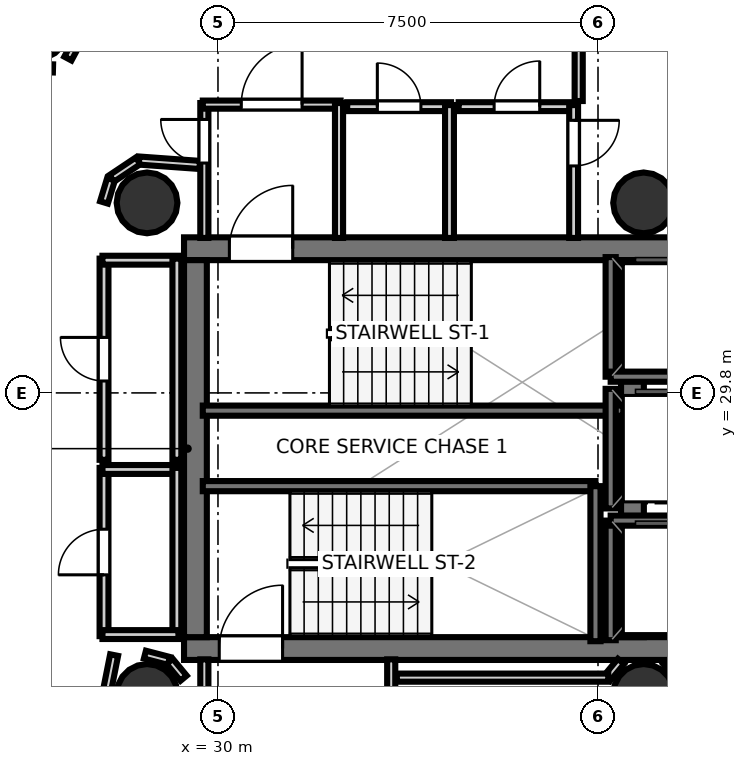
"""IFC4 building model, lengths in metres.
Left out: names, types, materials, properties, quantities, classifications, styles, units other than length and angle.
Written with IfcOpenShell. Run it as: python <this file> out.ifc"""

import sys

from ifc_helpers import new_model, si_unit, direction, frame, frame_2d, origin, origin_2d, place, context, subcontext, project, spatial, rectangle, hollow_circle, extrude, element, fill, save


model = new_model("IFC4")
c1 = context("Model", 3, precision=1e-05, world=origin(), true_north=direction((0.0, 1.0)))
c2 = subcontext(c1, "Body", "Model", "MODEL_VIEW")
j1 = project(units=[si_unit("LENGTHUNIT", "METRE"), si_unit("PLANEANGLEUNIT", "RADIAN")], contexts=[c1])
p1 = place(None, origin())
s1 = spatial("IfcSite", under=j1, at=p1, CompositionType="ELEMENT")
p2 = place(p1, origin())
s2 = spatial("IfcBuilding", under=s1, at=p2, CompositionType="ELEMENT")
p3 = place(p2, frame((0.0, 0.0, 211.4)))
s3 = spatial("IfcBuildingStorey", under=s2, at=p3, CompositionType="ELEMENT", Elevation=211.4)
p4 = place(p3, frame((29.33, 32.645, 0.0), z_axis=(0.0, 0.0, 1.0), x_axis=(1.0, 0.0, 0.0)))
e1 = element("IfcWall", 1, at=p4, inside=s3, PredefinedType="SHEAR", context=c2, shape_type="SweptSolid", body=[
    extrude(rectangle(XDim=10.52, YDim=0.45, at=frame_2d((5.26, 0.0))), origin(), (0.0, 0.0, 1.0), 3.52),
])
p5 = place(p4, frame((0.895, 0.0, 0.0)))
e2 = element("IfcOpeningElement", 2, at=p5, cuts=e1, PredefinedType="OPENING", context=c2, shape_type="SweptSolid", body=[
    extrude(rectangle(XDim=1.25, YDim=2.15, at=frame_2d((0.625, 1.075))), frame((0.0, 0.235, 0.0), z_axis=(0.0, -1.0, 0.0), x_axis=(1.0, 0.0, 0.0)), (0.0, 0.0, 1.0), 0.47),
])
p6 = place(p3, frame((29.33, 24.755, 0.0), z_axis=(0.0, 0.0, 1.0), x_axis=(1.0, 0.0, 0.0)))
e3 = element("IfcWall", 3, at=p6, inside=s3, PredefinedType="SHEAR", context=c2, shape_type="SweptSolid", body=[
    extrude(rectangle(XDim=10.52, YDim=0.45, at=frame_2d((5.26, 0.0))), origin(), (0.0, 0.0, 1.0), 3.52),
])
p7 = place(p6, frame((0.695, 0.0, 0.0)))
e4 = element("IfcOpeningElement", 4, at=p7, cuts=e3, PredefinedType="OPENING", context=c2, shape_type="SweptSolid", body=[
    extrude(rectangle(XDim=1.25, YDim=2.15, at=frame_2d((0.625, 1.075))), frame((0.0, 0.235, 0.0), z_axis=(0.0, -1.0, 0.0), x_axis=(1.0, 0.0, 0.0)), (0.0, 0.0, 1.0), 0.47),
])
for number, where, z_axis, x_axis in (
    (5, (29.555, 24.98, 0.0), (0.0, 0.0, 1.0), (0.0, 1.0, 0.0)),
    (6, (38.18, 24.98, 0.0), (0.0, 0.0, 1.0), (0.0, 1.0, 0.0)),
):
    element("IfcWall", number, at=place(p3, frame(where, z_axis=z_axis, x_axis=x_axis)), inside=s3, PredefinedType="SHEAR", context=c2, shape_type="SweptSolid", body=[
        extrude(rectangle(XDim=7.44, YDim=0.45, at=frame_2d((3.72, 0.0))), origin(), (0.0, 0.0, 1.0), 3.52),
    ])
for number, where, z_axis, x_axis in (
    (7, (28.6, 33.55, 0.0), (0.0, 0.0, 1.0), (1.0, 0.0, 0.0)),
    (8, (28.6, 23.85, 0.0), (0.0, 0.0, 1.0), (1.0, 0.0, 0.0)),
    (9, (38.4, 33.55, 0.0), (0.0, 0.0, 1.0), (1.0, 0.0, 0.0)),
    (10, (38.4, 23.85, 0.0), (0.0, 0.0, 1.0), (1.0, 0.0, 0.0)),
    (11, (26.431, 36.992, 0.0), (0.0, 0.0, 1.0), (1.0, 0.0, 0.0)),
):
    element("IfcColumn", number, at=place(p3, frame(where, z_axis=z_axis, x_axis=x_axis)), inside=s3, PredefinedType="COLUMN", context=c2, shape_type="SweptSolid", body=[
        extrude(hollow_circle(Radius=0.6, WallThickness=0.03, at=origin_2d()), origin(), (0.0, 0.0, 1.0), 3.7),
    ])
p8 = place(p3, frame((29.7, 29.45, 0.0), z_axis=(0.0, 0.0, 1.0), x_axis=(1.0, 0.0, 0.0)))
e12 = element("IfcWall", 12, at=p8, inside=s3, PredefinedType="SOLIDWALL", context=c2, shape_type="SweptSolid", body=[
    extrude(rectangle(XDim=8.3, YDim=0.2, at=frame_2d((4.15, 0.0))), origin(), (0.0, 0.0, 1.0), 3.52),
])
p9 = place(p3, frame((29.7, 27.96, 0.0), z_axis=(0.0, 0.0, 1.0), x_axis=(1.0, 0.0, 0.0)))
e13 = element("IfcWall", 13, at=p9, inside=s3, PredefinedType="SOLIDWALL", context=c2, shape_type="SweptSolid", body=[
    extrude(rectangle(XDim=7.75, YDim=0.2, at=frame_2d((3.875, 0.0))), origin(), (0.0, 0.0, 1.0), 3.52),
])
p10 = place(p3, frame((37.45, 24.9, 0.0), z_axis=(0.0, 0.0, 1.0), x_axis=(0.0, 1.0, 0.0)))
e14 = element("IfcWall", 14, at=p10, inside=s3, PredefinedType="SOLIDWALL", context=c2, shape_type="SweptSolid", body=[
    extrude(rectangle(XDim=3.06, YDim=0.2, at=frame_2d((1.53, 0.0))), origin(), (0.0, 0.0, 1.0), 3.52),
])
p11 = place(p3, frame((37.75, 30.12, 0.0), z_axis=(0.0, 0.0, 1.0), x_axis=(0.0, 1.0, 0.0)))
e15 = element("IfcWall", 15, at=p11, inside=s3, PredefinedType="SOLIDWALL", context=c2, shape_type="SweptSolid", body=[
    extrude(rectangle(XDim=2.36, YDim=0.2, at=frame_2d((1.18, 0.0))), origin(), (0.0, 0.0, 1.0), 3.52),
])
p12 = place(p3, frame((37.75, 30.12, 0.0), z_axis=(0.0, 0.0, 1.0), x_axis=(1.0, 0.0, 0.0)))
e16 = element("IfcWall", 16, at=p12, inside=s3, PredefinedType="SOLIDWALL", context=c2, shape_type="SweptSolid", body=[
    extrude(rectangle(XDim=2.1, YDim=0.2, at=frame_2d((1.05, 0.0))), origin(), (0.0, 0.0, 1.0), 3.52),
])
p13 = place(p3, frame((37.75, 24.92, 0.0), z_axis=(0.0, 0.0, 1.0), x_axis=(0.0, 1.0, 0.0)))
e17 = element("IfcWall", 17, at=p13, inside=s3, PredefinedType="SOLIDWALL", context=c2, shape_type="SweptSolid", body=[
    extrude(rectangle(XDim=2.36, YDim=0.2, at=frame_2d((1.18, 0.0))), origin(), (0.0, 0.0, 1.0), 3.52),
])
p14 = place(p3, frame((37.75, 27.28, 0.0), z_axis=(0.0, 0.0, 1.0), x_axis=(1.0, 0.0, 0.0)))
e18 = element("IfcWall", 18, at=p14, inside=s3, PredefinedType="SOLIDWALL", context=c2, shape_type="SweptSolid", body=[
    extrude(rectangle(XDim=2.1, YDim=0.2, at=frame_2d((1.05, 0.0))), origin(), (0.0, 0.0, 1.0), 3.52),
])
p15 = place(p3, frame((37.75, 27.52, 0.0), z_axis=(0.0, 0.0, 1.0), x_axis=(0.0, 1.0, 0.0)))
e19 = element("IfcWall", 19, at=p15, inside=s3, PredefinedType="SOLIDWALL", context=c2, shape_type="SweptSolid", body=[
    extrude(rectangle(XDim=2.36, YDim=0.2, at=frame_2d((1.18, 0.0))), origin(), (0.0, 0.0, 1.0), 3.52),
])
p16 = place(p3, frame((29.731, 32.858, 0.0), z_axis=(0.0, 0.0, 1.0), x_axis=(0.0, 1.0, 0.0)))
e20 = element("IfcWall", 20, at=p16, inside=s3, PredefinedType="PARTITIONING", context=c2, shape_type="SweptSolid", body=[
    extrude(rectangle(XDim=2.662, YDim=0.16, at=frame_2d((1.331, 0.0))), origin(), (0.0, 0.0, 1.0), 2.84),
])
p17 = place(p16, frame((1.478, 0.0, 0.0)))
e21 = element("IfcOpeningElement", 21, at=p17, cuts=e20, PredefinedType="OPENING", context=c2, shape_type="SweptSolid", body=[
    extrude(rectangle(XDim=0.86, YDim=2.05, at=frame_2d((0.43, 1.025))), frame((0.0, 0.09, 0.0), z_axis=(0.0, -1.0, 0.0), x_axis=(1.0, 0.0, 0.0)), (0.0, 0.0, 1.0), 0.18),
])
p18 = place(p3, frame((29.7, 35.489, 0.0), z_axis=(0.0, 0.0, 1.0), x_axis=(1.0, 0.0, 0.0)))
e22 = element("IfcWall", 22, at=p18, inside=s3, PredefinedType="PARTITIONING", context=c2, shape_type="SweptSolid", body=[
    extrude(rectangle(XDim=2.72, YDim=0.16, at=frame_2d((1.36, 0.0))), origin(), (0.0, 0.0, 1.0), 2.84),
])
p19 = place(p18, frame((0.76, 0.0, 0.0)))
e23 = element("IfcOpeningElement", 23, at=p19, cuts=e22, PredefinedType="OPENING", context=c2, shape_type="SweptSolid", body=[
    extrude(rectangle(XDim=1.2, YDim=2.15, at=frame_2d((0.6, 1.075))), frame((0.0, 0.09, 0.0), z_axis=(0.0, -1.0, 0.0), x_axis=(1.0, 0.0, 0.0)), (0.0, 0.0, 1.0), 0.18),
])
p20 = place(p3, frame((32.389, 35.52, 0.0), z_axis=(0.0, 0.0, 1.0), x_axis=(0.0, -1.0, 0.0)))
e24 = element("IfcWall", 24, at=p20, inside=s3, PredefinedType="PARTITIONING", context=c2, shape_type="SweptSolid", body=[
    extrude(rectangle(XDim=2.662, YDim=0.16, at=frame_2d((1.331, 0.0))), origin(), (0.0, 0.0, 1.0), 2.84),
])
for number, where, z_axis, x_axis in (
    (25, (29.731, 21.85, 0.0), (0.0, 0.0, 1.0), (0.0, 1.0, 0.0)),
    (26, (33.419, 24.542, 0.0), (0.0, 0.0, 1.0), (0.0, -1.0, 0.0)),
):
    element("IfcWall", number, at=place(p3, frame(where, z_axis=z_axis, x_axis=x_axis)), inside=s3, PredefinedType="PARTITIONING", context=c2, shape_type="SweptSolid", body=[
        extrude(rectangle(XDim=2.692, YDim=0.16, at=frame_2d((1.346, 0.0))), origin(), (0.0, 0.0, 1.0), 2.84),
    ])
p21 = place(p3, frame((32.55, 35.449, 0.0), z_axis=(0.0, 0.0, 1.0), x_axis=(1.0, 0.0, 0.0)))
e27 = element("IfcWall", 27, at=p21, inside=s3, PredefinedType="PLUMBINGWALL", context=c2, shape_type="SweptSolid", body=[
    extrude(rectangle(XDim=2.05, YDim=0.175, at=frame_2d((1.025, 0.0))), origin(), (0.0, 0.0, 1.0), 2.84),
])
p22 = place(p21, frame((0.595, 0.0, 0.0)))
e28 = element("IfcOpeningElement", 28, at=p22, cuts=e27, PredefinedType="OPENING", context=c2, shape_type="SweptSolid", body=[
    extrude(rectangle(XDim=0.86, YDim=2.05, at=frame_2d((0.43, 1.025))), frame((0.0, 0.097, 0.0), z_axis=(0.0, -1.0, 0.0), x_axis=(1.0, 0.0, 0.0)), (0.0, 0.0, 1.0), 0.195),
])
p23 = place(p3, frame((34.569, 35.48, 0.0), z_axis=(0.0, 0.0, 1.0), x_axis=(0.0, -1.0, 0.0)))
e29 = element("IfcWall", 29, at=p23, inside=s3, PredefinedType="PLUMBINGWALL", context=c2, shape_type="SweptSolid", body=[
    extrude(rectangle(XDim=2.622, YDim=0.175, at=frame_2d((1.311, 0.0))), origin(), (0.0, 0.0, 1.0), 2.84),
])
p24 = place(p3, frame((34.75, 35.449, 0.0), z_axis=(0.0, 0.0, 1.0), x_axis=(1.0, 0.0, 0.0)))
e30 = element("IfcWall", 30, at=p24, inside=s3, PredefinedType="PLUMBINGWALL", context=c2, shape_type="SweptSolid", body=[
    extrude(rectangle(XDim=2.3, YDim=0.175, at=frame_2d((1.15, 0.0))), origin(), (0.0, 0.0, 1.0), 2.84),
])
p25 = place(p24, frame((0.7, 0.0, 0.0)))
e31 = element("IfcOpeningElement", 31, at=p25, cuts=e30, PredefinedType="OPENING", context=c2, shape_type="SweptSolid", body=[
    extrude(rectangle(XDim=0.9, YDim=2.1, at=frame_2d((0.45, 1.05))), frame((0.0, 0.097, 0.0), z_axis=(0.0, -1.0, 0.0), x_axis=(1.0, 0.0, 0.0)), (0.0, 0.0, 1.0), 0.195),
])
p26 = place(p3, frame((37.019, 35.48, 0.0), z_axis=(0.0, 0.0, 1.0), x_axis=(0.0, -1.0, 0.0)))
e32 = element("IfcWall", 32, at=p26, inside=s3, PredefinedType="PLUMBINGWALL", context=c2, shape_type="SweptSolid", body=[
    extrude(rectangle(XDim=2.622, YDim=0.175, at=frame_2d((1.311, 0.0))), origin(), (0.0, 0.0, 1.0), 2.84),
])
p27 = place(p26, frame((0.301, 0.0, 0.0)))
e33 = element("IfcOpeningElement", 33, at=p27, cuts=e32, PredefinedType="OPENING", context=c2, shape_type="SweptSolid", body=[
    extrude(rectangle(XDim=0.9, YDim=2.1, at=frame_2d((0.45, 1.05))), frame((0.0, 0.097, 0.0), z_axis=(0.0, -1.0, 0.0), x_axis=(1.0, 0.0, 0.0)), (0.0, 0.0, 1.0), 0.195),
])
p28 = place(p3, frame((27.751, 25.0, 0.0), z_axis=(0.0, 0.0, 1.0), x_axis=(0.0, 1.0, 0.0)))
e34 = element("IfcWall", 34, at=p28, inside=s3, PredefinedType="PLUMBINGWALL", context=c2, shape_type="SweptSolid", body=[
    extrude(rectangle(XDim=3.32, YDim=0.175, at=frame_2d((1.66, 0.0))), origin(), (0.0, 0.0, 1.0), 2.84),
])
p29 = place(p28, frame((1.21, 0.0, 0.0)))
e35 = element("IfcOpeningElement", 35, at=p29, cuts=e34, PredefinedType="OPENING", context=c2, shape_type="SweptSolid", body=[
    extrude(rectangle(XDim=0.9, YDim=2.1, at=frame_2d((0.45, 1.05))), frame((0.0, 0.097, 0.0), z_axis=(0.0, -1.0, 0.0), x_axis=(1.0, 0.0, 0.0)), (0.0, 0.0, 1.0), 0.195),
])
p30 = place(p3, frame((27.72, 28.289, 0.0), z_axis=(0.0, 0.0, 1.0), x_axis=(1.0, 0.0, 0.0)))
e36 = element("IfcWall", 36, at=p30, inside=s3, PredefinedType="PLUMBINGWALL", context=c2, shape_type="SweptSolid", body=[
    extrude(rectangle(XDim=1.5, YDim=0.175, at=frame_2d((0.75, 0.0))), origin(), (0.0, 0.0, 1.0), 2.84),
])
p31 = place(p3, frame((29.189, 28.32, 0.0), z_axis=(0.0, 0.0, 1.0), x_axis=(0.0, -1.0, 0.0)))
e37 = element("IfcWall", 37, at=p31, inside=s3, PredefinedType="PLUMBINGWALL", context=c2, shape_type="SweptSolid", body=[
    extrude(rectangle(XDim=3.32, YDim=0.175, at=frame_2d((1.66, 0.0))), origin(), (0.0, 0.0, 1.0), 2.84),
])
p32 = place(p3, frame((29.22, 25.031, 0.0), z_axis=(0.0, 0.0, 1.0), x_axis=(-1.0, 0.0, 0.0)))
e38 = element("IfcWall", 38, at=p32, inside=s3, PredefinedType="PLUMBINGWALL", context=c2, shape_type="SweptSolid", body=[
    extrude(rectangle(XDim=1.5, YDim=0.175, at=frame_2d((0.75, 0.0))), origin(), (0.0, 0.0, 1.0), 2.84),
])
p33 = place(p3, frame((27.751, 28.48, 0.0), z_axis=(0.0, 0.0, 1.0), x_axis=(0.0, 1.0, 0.0)))
e39 = element("IfcWall", 39, at=p33, inside=s3, PredefinedType="PLUMBINGWALL", context=c2, shape_type="SweptSolid", body=[
    extrude(rectangle(XDim=3.97, YDim=0.175, at=frame_2d((1.985, 0.0))), origin(), (0.0, 0.0, 1.0), 2.84),
])
p34 = place(p33, frame((1.555, 0.0, 0.0)))
e40 = element("IfcOpeningElement", 40, at=p34, cuts=e39, PredefinedType="OPENING", context=c2, shape_type="SweptSolid", body=[
    extrude(rectangle(XDim=0.86, YDim=2.05, at=frame_2d((0.43, 1.025))), frame((0.0, 0.097, 0.0), z_axis=(0.0, -1.0, 0.0), x_axis=(1.0, 0.0, 0.0)), (0.0, 0.0, 1.0), 0.195),
])
p35 = place(p3, frame((27.72, 32.419, 0.0), z_axis=(0.0, 0.0, 1.0), x_axis=(1.0, 0.0, 0.0)))
e41 = element("IfcWall", 41, at=p35, inside=s3, PredefinedType="PLUMBINGWALL", context=c2, shape_type="SweptSolid", body=[
    extrude(rectangle(XDim=1.5, YDim=0.175, at=frame_2d((0.75, 0.0))), origin(), (0.0, 0.0, 1.0), 2.84),
])
p36 = place(p3, frame((29.189, 32.45, 0.0), z_axis=(0.0, 0.0, 1.0), x_axis=(0.0, -1.0, 0.0)))
e42 = element("IfcWall", 42, at=p36, inside=s3, PredefinedType="PLUMBINGWALL", context=c2, shape_type="SweptSolid", body=[
    extrude(rectangle(XDim=3.97, YDim=0.175, at=frame_2d((1.985, 0.0))), origin(), (0.0, 0.0, 1.0), 2.84),
])
p37 = place(p3, frame((29.321, 24.17, 0.0), z_axis=(0.0, 0.0, 1.0), x_axis=(-0.638008265708, 0.770029514296, 0.0)))
e43 = element("IfcWall", 43, at=p37, inside=s3, PredefinedType="PARTITIONING", context=c2, shape_type="SweptSolid", body=[
    extrude(rectangle(XDim=0.431, YDim=0.16, at=frame_2d((0.215, 0.0))), origin(), (0.0, 0.0, 1.0), 2.84),
])
p38 = place(p3, frame((29.03, 24.512, 0.0), z_axis=(0.0, 0.0, 1.0), x_axis=(-0.967681003213, 0.252177469296, 0.0)))
e44 = element("IfcWall", 44, at=p38, inside=s3, PredefinedType="PARTITIONING", context=c2, shape_type="SweptSolid", body=[
    extrude(rectangle(XDim=0.488, YDim=0.16, at=frame_2d((0.244, 0.0))), origin(), (0.0, 0.0, 1.0), 2.84),
])
for number, where, z_axis, x_axis in (
    (45, (39.121, 24.17, 0.0), (0.0, 0.0, 1.0), (-0.638, 0.77, 0.0)),
    (46, (37.954, 24.502, 0.0), (0.0, 0.0, 1.0), (-0.638, -0.77, 0.0)),
):
    element("IfcWall", number, at=place(p3, frame(where, z_axis=z_axis, x_axis=x_axis)), inside=s3, PredefinedType="PARTITIONING", context=c2, shape_type="SweptSolid", body=[
        extrude(rectangle(XDim=0.431, YDim=0.16, at=frame_2d((0.215, 0.0))), origin(), (0.0, 0.0, 1.0), 2.84),
    ])
p39 = place(p3, frame((37.703, 24.181, 0.0), z_axis=(0.0, 0.0, 1.0), x_axis=(-1.0, 0.0, 0.0)))
e47 = element("IfcWall", 47, at=p39, inside=s3, PredefinedType="PARTITIONING", context=c2, shape_type="SweptSolid", body=[
    extrude(rectangle(XDim=4.173, YDim=0.16, at=frame_2d((2.086, 0.0))), origin(), (0.0, 0.0, 1.0), 2.84),
])
p40 = place(p3, frame((37.119, 37.896, 0.0), z_axis=(0.0, 0.0, 1.0), x_axis=(0.0, -1.0, 0.0)))
e48 = element("IfcWall", 48, at=p40, inside=s3, PredefinedType="PARTITIONING", context=c2, shape_type="SweptSolid", body=[
    extrude(rectangle(XDim=2.336, YDim=0.16, at=frame_2d((1.168, 0.0))), origin(), (0.0, 0.0, 1.0), 2.84),
])
p41 = place(p3, frame((29.64, 34.299, 0.0), z_axis=(0.0, 0.0, 1.0), x_axis=(-0.997392224386, 0.072171675429, 0.0)))
e49 = element("IfcWall", 49, at=p41, inside=s3, PredefinedType="PARTITIONING", context=c2, shape_type="SweptSolid", body=[
    extrude(rectangle(XDim=1.201, YDim=0.16, at=frame_2d((0.601, 0.0))), origin(), (0.0, 0.0, 1.0), 2.84),
])
p42 = place(p3, frame((28.423, 34.38, 0.0), z_axis=(0.0, 0.0, 1.0), x_axis=(-0.831571279003, -0.555418047903, 0.0)))
e50 = element("IfcWall", 50, at=p42, inside=s3, PredefinedType="PARTITIONING", context=c2, shape_type="SweptSolid", body=[
    extrude(rectangle(XDim=0.628, YDim=0.16, at=frame_2d((0.314, 0.0))), origin(), (0.0, 0.0, 1.0), 2.84),
])
p43 = place(p3, frame((27.888, 34.015, 0.0), z_axis=(0.0, 0.0, 1.0), x_axis=(-0.290263585829, -0.956946733492, 0.0)))
e51 = element("IfcWall", 51, at=p43, inside=s3, PredefinedType="PARTITIONING", context=c2, shape_type="SweptSolid", body=[
    extrude(rectangle(XDim=0.476, YDim=0.16, at=frame_2d((0.238, 0.0))), origin(), (0.0, 0.0, 1.0), 2.84),
])
p44 = place(p3, frame((27.95, 24.626, 0.0), z_axis=(0.0, 0.0, 1.0), x_axis=(-0.195125950178, -0.980778192848, 0.0)))
e52 = element("IfcWall", 52, at=p44, inside=s3, PredefinedType="PARTITIONING", context=c2, shape_type="SweptSolid", body=[
    extrude(rectangle(XDim=0.948, YDim=0.16, at=frame_2d((0.474, 0.0))), origin(), (0.0, 0.0, 1.0), 2.84),
])
p45 = place(p3, frame((25.449, 36.238, 0.0), z_axis=(0.0, 0.0, 1.0), x_axis=(0.999651698073, -0.026390955635, 0.0)))
e53 = element("IfcWall", 53, at=p45, inside=s3, PredefinedType="PARTITIONING", context=c2, shape_type="SweptSolid", body=[
    extrude(rectangle(XDim=1.295, YDim=0.16, at=frame_2d((0.647, 0.0))), origin(), (0.0, 0.0, 1.0), 2.84),
])
p46 = place(p3, frame((27.038, 36.398, 0.0), z_axis=(0.0, 0.0, 1.0), x_axis=(0.471865548338, 0.881670519123, 0.0)))
e54 = element("IfcWall", 54, at=p46, inside=s3, PredefinedType="PARTITIONING", context=c2, shape_type="SweptSolid", body=[
    extrude(rectangle(XDim=0.476, YDim=0.16, at=frame_2d((0.238, 0.0))), origin(), (0.0, 0.0, 1.0), 2.84),
])
p47 = place(p3, frame((37.225, 37.301, 0.0), z_axis=(0.0, 0.0, 1.0), x_axis=(0.987268097612, -0.159065091827, 0.0)))
e55 = element("IfcWall", 55, at=p47, inside=s3, PredefinedType="PLUMBINGWALL", context=c2, shape_type="SweptSolid", body=[
    extrude(rectangle(XDim=11.926, YDim=0.175, at=frame_2d((5.963, 0.0))), origin(), (0.0, 0.0, 1.0), 2.84),
])
p48 = place(p5, origin())
e56 = element("IfcDoor", 56, at=p48, inside=s3, OperationType="SINGLE_SWING_RIGHT", PredefinedType="DOOR", context=c2, shape_type="SweptSolid", body=[
    extrude(rectangle(XDim=1.25, YDim=2.15, at=frame_2d((0.625, 1.075))), frame((0.0, 0.025, 0.0), z_axis=(0.0, -1.0, 0.0), x_axis=(1.0, 0.0, 0.0)), (0.0, 0.0, 1.0), 0.05),
])
fill(e2, e56)
p49 = place(p7, origin())
e57 = element("IfcDoor", 57, at=p49, inside=s3, OperationType="SINGLE_SWING_RIGHT", PredefinedType="DOOR", context=c2, shape_type="SweptSolid", body=[
    extrude(rectangle(XDim=1.25, YDim=2.15, at=frame_2d((0.625, 1.075))), frame((0.0, 0.025, 0.0), z_axis=(0.0, -1.0, 0.0), x_axis=(1.0, 0.0, 0.0)), (0.0, 0.0, 1.0), 0.05),
])
fill(e4, e57)
p50 = place(p19, origin())
e58 = element("IfcDoor", 58, at=p50, inside=s3, OperationType="SINGLE_SWING_RIGHT", PredefinedType="DOOR", context=c2, shape_type="SweptSolid", body=[
    extrude(rectangle(XDim=1.2, YDim=2.15, at=frame_2d((0.6, 1.075))), frame((0.0, 0.025, 0.0), z_axis=(0.0, -1.0, 0.0), x_axis=(1.0, 0.0, 0.0)), (0.0, 0.0, 1.0), 0.05),
])
fill(e23, e58)
p51 = place(p22, origin())
e59 = element("IfcDoor", 59, at=p51, inside=s3, OperationType="SINGLE_SWING_LEFT", PredefinedType="DOOR", context=c2, shape_type="SweptSolid", body=[
    extrude(rectangle(XDim=0.86, YDim=2.05, at=frame_2d((0.43, 1.025))), frame((0.0, 0.025, 0.0), z_axis=(0.0, -1.0, 0.0), x_axis=(1.0, 0.0, 0.0)), (0.0, 0.0, 1.0), 0.05),
])
fill(e28, e59)
p52 = place(p25, origin())
e60 = element("IfcDoor", 60, at=p52, inside=s3, OperationType="SINGLE_SWING_RIGHT", PredefinedType="DOOR", context=c2, shape_type="SweptSolid", body=[
    extrude(rectangle(XDim=0.9, YDim=2.1, at=frame_2d((0.45, 1.05))), frame((0.0, 0.025, 0.0), z_axis=(0.0, -1.0, 0.0), x_axis=(1.0, 0.0, 0.0)), (0.0, 0.0, 1.0), 0.05),
])
fill(e31, e60)
p53 = place(p29, origin())
e61 = element("IfcDoor", 61, at=p53, inside=s3, OperationType="SINGLE_SWING_LEFT", PredefinedType="DOOR", context=c2, shape_type="SweptSolid", body=[
    extrude(rectangle(XDim=0.9, YDim=2.1, at=frame_2d((0.45, 1.05))), frame((0.0, 0.025, 0.0), z_axis=(0.0, -1.0, 0.0), x_axis=(1.0, 0.0, 0.0)), (0.0, 0.0, 1.0), 0.05),
])
fill(e35, e61)
p54 = place(p34, origin())
e62 = element("IfcDoor", 62, at=p54, inside=s3, OperationType="SINGLE_SWING_RIGHT", PredefinedType="DOOR", context=c2, shape_type="SweptSolid", body=[
    extrude(rectangle(XDim=0.86, YDim=2.05, at=frame_2d((0.43, 1.025))), frame((0.0, 0.025, 0.0), z_axis=(0.0, -1.0, 0.0), x_axis=(1.0, 0.0, 0.0)), (0.0, 0.0, 1.0), 0.05),
])
fill(e40, e62)
p55 = place(p17, origin())
e63 = element("IfcDoor", 63, at=p55, inside=s3, OperationType="SINGLE_SWING_RIGHT", PredefinedType="DOOR", context=c2, shape_type="SweptSolid", body=[
    extrude(rectangle(XDim=0.86, YDim=2.05, at=frame_2d((0.43, 1.025))), frame((0.0, 0.025, 0.0), z_axis=(0.0, -1.0, 0.0), x_axis=(1.0, 0.0, 0.0)), (0.0, 0.0, 1.0), 0.05),
])
fill(e21, e63)
p56 = place(p27, origin())
e64 = element("IfcDoor", 64, at=p56, inside=s3, OperationType="SINGLE_SWING_LEFT", PredefinedType="DOOR", context=c2, shape_type="SweptSolid", body=[
    extrude(rectangle(XDim=0.9, YDim=2.1, at=frame_2d((0.45, 1.05))), frame((0.0, 0.025, 0.0), z_axis=(0.0, -1.0, 0.0), x_axis=(1.0, 0.0, 0.0)), (0.0, 0.0, 1.0), 0.05),
])
fill(e33, e64)
save(model, sys.argv[1])
